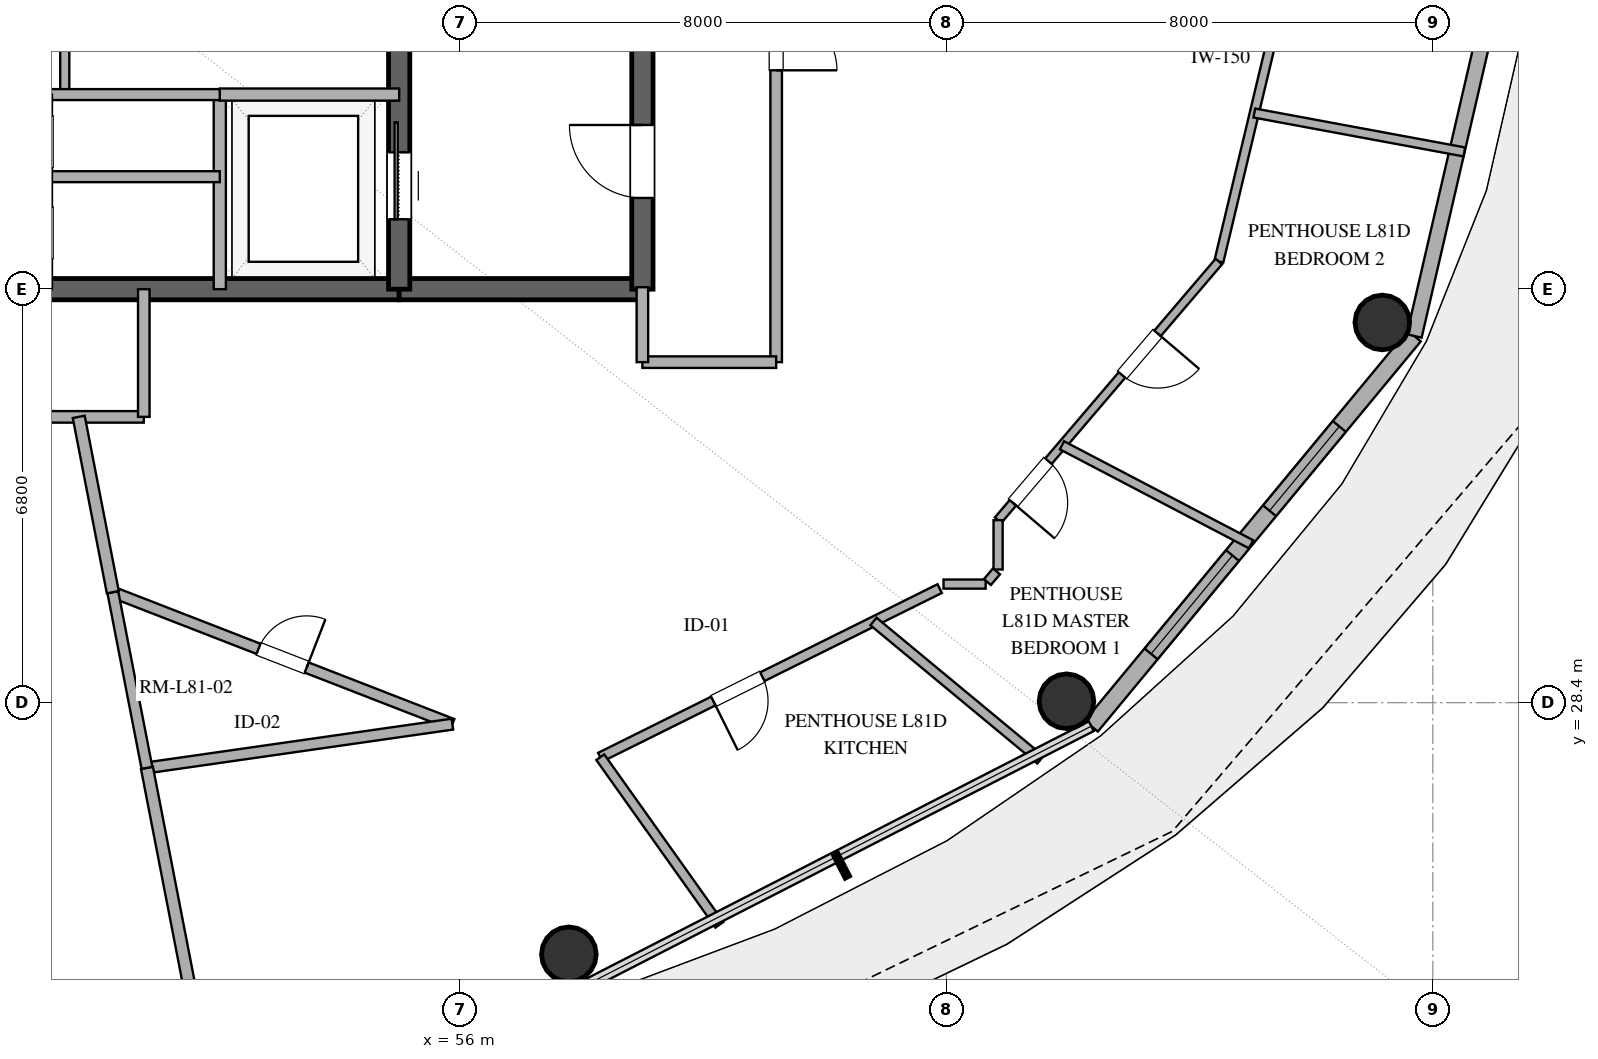
"""IFC4 building model, lengths in metres.
Left out: names, types, materials, properties, quantities, classifications, styles, units other than length and angle.
Written with IfcOpenShell. Run it as: python <this file> out.ifc"""

import sys

from ifc_helpers import new_model, si_unit, direction, frame, frame_2d, origin, origin_2d, place, context, subcontext, project, spatial, rectangle, hollow_circle, extrude, element, fill, save


model = new_model("IFC4")
c1 = context("Model", 3, precision=1e-05, world=origin(), true_north=direction((0.0, 1.0)))
c2 = subcontext(c1, "Body", "Model", "MODEL_VIEW")
j1 = project(units=[si_unit("LENGTHUNIT", "METRE"), si_unit("PLANEANGLEUNIT", "RADIAN")], contexts=[c1])
p1 = place(None, origin())
s1 = spatial("IfcSite", under=j1, at=p1, CompositionType="ELEMENT")
p2 = place(p1, origin())
s2 = spatial("IfcBuilding", under=s1, at=p2, CompositionType="ELEMENT")
p3 = place(p2, frame((0.0, 0.0, 312.6)))
s3 = spatial("IfcBuildingStorey", under=s2, at=p3, CompositionType="ELEMENT", Elevation=312.6)
p4 = place(p3, frame((41.0, 35.2, 0.0), z_axis=(0.0, 0.0, 1.0), x_axis=(1.0, 0.0, 0.0)))
e1 = element("IfcWall", 1, at=p4, inside=s3, PredefinedType="SHEAR", context=c2, shape_type="SweptSolid", body=[
    extrude(rectangle(XDim=14.0, YDim=0.35, at=frame_2d((7.0, 0.0))), origin(), (0.0, 0.0, 1.0), 3.64),
])
p5 = place(p4, frame((6.1, 0.0, 0.0)))
e2 = element("IfcOpeningElement", 2, at=p5, cuts=e1, PredefinedType="OPENING", context=c2, shape_type="SweptSolid", body=[
    extrude(rectangle(XDim=1.8, YDim=2.25, at=frame_2d((0.9, 1.125))), frame((0.0, 0.185, 0.0), z_axis=(0.0, -1.0, 0.0), x_axis=(1.0, 0.0, 0.0)), (0.0, 0.0, 1.0), 0.37),
])
p6 = place(p3, frame((55.0, 35.2, 0.0), z_axis=(0.0, 0.0, 1.0), x_axis=(1.0, 0.0, 0.0)))
e3 = element("IfcWall", 3, at=p6, inside=s3, PredefinedType="SHEAR", context=c2, shape_type="SweptSolid", body=[
    extrude(rectangle(XDim=4.0, YDim=0.35, at=frame_2d((2.0, 0.0))), origin(), (0.0, 0.0, 1.0), 3.64),
])
p7 = place(p3, frame((59.0, 35.2, 0.0), z_axis=(0.0, 0.0, 1.0), x_axis=(0.0, 1.0, 0.0)))
e4 = element("IfcWall", 4, at=p7, inside=s3, PredefinedType="SHEAR", context=c2, shape_type="SweptSolid", body=[
    extrude(rectangle(XDim=13.6, YDim=0.35, at=frame_2d((6.8, 0.0))), origin(), (0.0, 0.0, 1.0), 3.64),
])
p8 = place(p7, frame((1.5, 0.0, 0.0)))
e5 = element("IfcOpeningElement", 5, at=p8, cuts=e4, PredefinedType="OPENING", context=c2, shape_type="SweptSolid", body=[
    extrude(rectangle(XDim=1.2, YDim=2.15, at=frame_2d((0.6, 1.075))), frame((0.0, 0.185, 0.0), z_axis=(0.0, -1.0, 0.0), x_axis=(1.0, 0.0, 0.0)), (0.0, 0.0, 1.0), 0.37),
])
p9 = place(p3, frame((55.0, 35.2, 0.0), z_axis=(0.0, 0.0, 1.0), x_axis=(0.0, 1.0, 0.0)))
e6 = element("IfcWall", 6, at=p9, inside=s3, PredefinedType="SHEAR", context=c2, shape_type="SweptSolid", body=[
    extrude(rectangle(XDim=13.6, YDim=0.35, at=frame_2d((6.8, 0.0))), origin(), (0.0, 0.0, 1.0), 3.64),
])
p10 = place(p9, frame((1.15, 0.0, 0.0)))
e7 = element("IfcOpeningElement", 7, at=p10, cuts=e6, PredefinedType="OPENING", context=c2, shape_type="SweptSolid", body=[
    extrude(rectangle(XDim=1.1, YDim=2.2, at=frame_2d((0.55, 1.1))), frame((0.0, 0.185, 0.0), z_axis=(0.0, -1.0, 0.0), x_axis=(1.0, 0.0, 0.0)), (0.0, 0.0, 1.0), 0.37),
])
for number, where, z_axis, x_axis in (
    (8, (57.791, 24.261, 0.0), (0.0, 0.0, 1.0), (1.0, 0.0, 0.0)),
    (9, (65.975, 28.424, 0.0), (0.0, 0.0, 1.0), (1.0, 0.0, 0.0)),
    (10, (71.169, 34.653, 0.0), (0.0, 0.0, 1.0), (1.0, 0.0, 0.0)),
):
    element("IfcColumn", number, at=place(p3, frame(where, z_axis=z_axis, x_axis=x_axis)), inside=s3, PredefinedType="COLUMN", context=c2, shape_type="SweptSolid", body=[
        extrude(hollow_circle(Radius=0.45, WallThickness=0.025, at=origin_2d()), origin(), (0.0, 0.0, 1.0), 3.64),
    ])
p11 = place(p3, frame((48.0, 22.22, 0.0), z_axis=(0.0, 0.0, 1.0), x_axis=(0.988882522213, 0.148698881169, 0.0)))
e11 = element("IfcWall", 11, at=p11, inside=s3, PredefinedType="SOLIDWALL", context=c2, shape_type="SweptSolid", body=[
    extrude(rectangle(XDim=10.125, YDim=0.28, at=frame_2d((5.062, 0.0))), origin(), (0.0, 0.0, 1.0), 3.64),
])
p12 = place(p11, frame((1.516, 0.0, 0.0)))
e12 = element("IfcOpeningElement", 12, at=p12, cuts=e11, PredefinedType="OPENING", context=c2, shape_type="SweptSolid", body=[
    extrude(rectangle(XDim=1.6, YDim=2.25, at=frame_2d((0.8, 1.125))), frame((0.0, 0.15, 0.0), z_axis=(0.0, -1.0, 0.0), x_axis=(1.0, 0.0, 0.0)), (0.0, 0.0, 1.0), 0.3),
])
p13 = place(p11, frame((4.75, 0.0, 0.85)))
e13 = element("IfcOpeningElement", 13, at=p13, cuts=e11, PredefinedType="OPENING", context=c2, shape_type="SweptSolid", body=[
    extrude(rectangle(XDim=1.2, YDim=1.6, at=frame_2d((0.6, 0.8))), frame((0.0, 0.15, 0.0), z_axis=(0.0, -1.0, 0.0), x_axis=(1.0, 0.0, 0.0)), (0.0, 0.0, 1.0), 0.3),
])
p14 = place(p11, frame((6.668, 0.0, 0.85)))
e14 = element("IfcOpeningElement", 14, at=p14, cuts=e11, PredefinedType="OPENING", context=c2, shape_type="SweptSolid", body=[
    extrude(rectangle(XDim=1.2, YDim=1.6, at=frame_2d((0.6, 0.8))), frame((0.0, 0.15, 0.0), z_axis=(0.0, -1.0, 0.0), x_axis=(1.0, 0.0, 0.0)), (0.0, 0.0, 1.0), 0.3),
])
p15 = place(p3, frame((66.383, 28.013, 0.0), z_axis=(0.0, 0.0, 1.0), x_axis=(0.63761509934, 0.770355103243, 0.0)))
e15 = element("IfcWall", 15, at=p15, inside=s3, PredefinedType="SOLIDWALL", context=c2, shape_type="SweptSolid", body=[
    extrude(rectangle(XDim=8.33, YDim=0.28, at=frame_2d((4.165, 0.0))), origin(), (0.0, 0.0, 1.0), 3.64),
])
p16 = place(p15, frame((1.543, 0.0, 0.85)))
e16 = element("IfcOpeningElement", 16, at=p16, cuts=e15, PredefinedType="OPENING", context=c2, shape_type="SweptSolid", body=[
    extrude(rectangle(XDim=2.1, YDim=2.2, at=frame_2d((1.05, 1.1))), frame((0.0, 0.15, 0.0), z_axis=(0.0, -1.0, 0.0), x_axis=(1.0, 0.0, 0.0)), (0.0, 0.0, 1.0), 0.3),
])
p17 = place(p15, frame((4.598, 0.0, 0.85)))
e17 = element("IfcOpeningElement", 17, at=p17, cuts=e15, PredefinedType="OPENING", context=c2, shape_type="SweptSolid", body=[
    extrude(rectangle(XDim=1.8, YDim=2.2, at=frame_2d((0.9, 1.1))), frame((0.0, 0.15, 0.0), z_axis=(0.0, -1.0, 0.0), x_axis=(1.0, 0.0, 0.0)), (0.0, 0.0, 1.0), 0.3),
])
p18 = place(p3, frame((71.694, 34.43, 0.0), z_axis=(0.0, 0.0, 1.0), x_axis=(0.225635078214, 0.974211892495, 0.0)))
e18 = element("IfcWall", 18, at=p18, inside=s3, PredefinedType="SOLIDWALL", context=c2, shape_type="SweptSolid", body=[
    extrude(rectangle(XDim=7.77, YDim=0.25, at=frame_2d((3.885, 0.0))), origin(), (0.0, 0.0, 1.0), 3.64),
])
p19 = place(p3, frame((52.05, 35.2, 0.0), z_axis=(0.0, 0.0, 1.0), x_axis=(0.0, 1.0, 0.0)))
e19 = element("IfcWall", 19, at=p19, inside=s3, PredefinedType="SOLIDWALL", context=c2, shape_type="SweptSolid", body=[
    extrude(rectangle(XDim=3.2, YDim=0.2, at=frame_2d((1.6, 0.0))), origin(), (0.0, 0.0, 1.0), 2.34),
])
p20 = place(p3, frame((52.05, 38.4, 0.0), z_axis=(0.0, 0.0, 1.0), x_axis=(1.0, 0.0, 0.0)))
e20 = element("IfcWall", 20, at=p20, inside=s3, PredefinedType="SOLIDWALL", context=c2, shape_type="SweptSolid", body=[
    extrude(rectangle(XDim=2.95, YDim=0.2, at=frame_2d((1.475, 0.0))), origin(), (0.0, 0.0, 1.0), 2.34),
])
p21 = place(p3, frame((49.5, 38.4, 0.0), z_axis=(0.0, 0.0, 1.0), x_axis=(0.0, 1.0, 0.0)))
e21 = element("IfcWall", 21, at=p21, inside=s3, PredefinedType="PARTITIONING", context=c2, shape_type="SweptSolid", body=[
    extrude(rectangle(XDim=2.58, YDim=0.15, at=frame_2d((1.29, 0.0))), origin(), (0.0, 0.0, 1.0), 2.34),
])
p22 = place(p21, frame((0.8, 0.0, 0.0)))
e22 = element("IfcOpeningElement", 22, at=p22, cuts=e21, PredefinedType="OPENING", context=c2, shape_type="SweptSolid", body=[
    extrude(rectangle(XDim=0.9, YDim=2.15, at=frame_2d((0.45, 1.075))), frame((0.0, 0.085, 0.0), z_axis=(0.0, -1.0, 0.0), x_axis=(1.0, 0.0, 0.0)), (0.0, 0.0, 1.0), 0.17),
])
for number, where, z_axis, x_axis in (
    (23, (49.2, 37.05, 0.0), (0.0, 0.0, 1.0), (1.0, 0.0, 0.0)),
    (24, (49.2, 38.4, 0.0), (0.0, 0.0, 1.0), (1.0, 0.0, 0.0)),
):
    element("IfcWall", number, at=place(p3, frame(where, z_axis=z_axis, x_axis=x_axis)), inside=s3, PredefinedType="PLUMBINGWALL", context=c2, shape_type="SweptSolid", body=[
        extrude(rectangle(XDim=2.85, YDim=0.18, at=frame_2d((1.425, 0.0))), origin(), (0.0, 0.0, 1.0), 2.34),
    ])
p23 = place(p3, frame((61.2, 50.9, 0.0), z_axis=(0.0, 0.0, 1.0), x_axis=(0.0, -1.0, 0.0)))
e25 = element("IfcWall", 25, at=p23, inside=s3, PredefinedType="PARTITIONING", context=c2, shape_type="SweptSolid", body=[
    extrude(rectangle(XDim=16.9, YDim=0.19, at=frame_2d((8.45, 0.0))), origin(), (0.0, 0.0, 1.0), 2.34),
])
p24 = place(p23, frame((11.101, 0.0, 0.0)))
e26 = element("IfcOpeningElement", 26, at=p24, cuts=e25, PredefinedType="OPENING", context=c2, shape_type="SweptSolid", body=[
    extrude(rectangle(XDim=1.0, YDim=2.2, at=frame_2d((0.5, 1.1))), frame((0.0, 0.105, 0.0), z_axis=(0.0, -1.0, 0.0), x_axis=(1.0, 0.0, 0.0)), (0.0, 0.0, 1.0), 0.21),
])
p25 = place(p3, frame((50.291, 30.216, 0.0), z_axis=(0.0, 0.0, 1.0), x_axis=(0.932120865565, -0.362147334628, 0.0)))
e27 = element("IfcWall", 27, at=p25, inside=s3, PredefinedType="PLUMBINGWALL", context=c2, shape_type="SweptSolid", body=[
    extrude(rectangle(XDim=5.991, YDim=0.18, at=frame_2d((2.996, 0.0))), origin(), (0.0, 0.0, 1.0), 2.34),
])
p26 = place(p25, frame((2.571, 0.0, 0.0)))
e28 = element("IfcOpeningElement", 28, at=p26, cuts=e27, PredefinedType="OPENING", context=c2, shape_type="SweptSolid", body=[
    extrude(rectangle(XDim=0.85, YDim=2.1, at=frame_2d((0.425, 1.05))), frame((0.0, 0.1, 0.0), z_axis=(0.0, -1.0, 0.0), x_axis=(1.0, 0.0, 0.0)), (0.0, 0.0, 1.0), 0.2),
])
p27 = place(p3, frame((55.875, 28.047, 0.0), z_axis=(0.0, 0.0, 1.0), x_axis=(-0.989917714359, -0.141643633102, 0.0)))
e29 = element("IfcWall", 29, at=p27, inside=s3, PredefinedType="PLUMBINGWALL", context=c2, shape_type="SweptSolid", body=[
    extrude(rectangle(XDim=5.074, YDim=0.18, at=frame_2d((2.537, 0.0))), origin(), (0.0, 0.0, 1.0), 2.34),
])
p28 = place(p3, frame((63.89, 30.276, 0.0), z_axis=(0.0, 0.0, 1.0), x_axis=(-0.895583517023, -0.444893429977, 0.0)))
e30 = element("IfcWall", 30, at=p28, inside=s3, PredefinedType="PLUMBINGWALL", context=c2, shape_type="SweptSolid", body=[
    extrude(rectangle(XDim=6.233, YDim=0.16, at=frame_2d((3.117, 0.0))), origin(), (0.0, 0.0, 1.0), 2.34),
])
p29 = place(p28, frame((3.257, 0.0, 0.0)))
e31 = element("IfcOpeningElement", 31, at=p29, cuts=e30, PredefinedType="OPENING", context=c2, shape_type="SweptSolid", body=[
    extrude(rectangle(XDim=0.9, YDim=2.1, at=frame_2d((0.45, 1.05))), frame((0.0, 0.09, 0.0), z_axis=(0.0, -1.0, 0.0), x_axis=(1.0, 0.0, 0.0)), (0.0, 0.0, 1.0), 0.18),
])
p30 = place(p3, frame((51.759, 22.664, 0.0), z_axis=(0.0, 0.0, 1.0), x_axis=(-0.190846277625, 0.981619935778, 0.0)))
e32 = element("IfcWall", 32, at=p30, inside=s3, PredefinedType="PARTITIONING", context=c2, shape_type="SweptSolid", body=[
    extrude(rectangle(XDim=4.751, YDim=0.2, at=frame_2d((2.375, 0.0))), origin(), (0.0, 0.0, 1.0), 2.34),
])
p31 = place(p3, frame((50.8, 33.1, 0.0), z_axis=(0.0, 0.0, 1.0), x_axis=(-1.0, 0.0, 0.0)))
e33 = element("IfcWall", 33, at=p31, inside=s3, PredefinedType="PARTITIONING", context=c2, shape_type="SweptSolid", body=[
    extrude(rectangle(XDim=5.6, YDim=0.19, at=frame_2d((2.8, 0.0))), origin(), (0.0, 0.0, 1.0), 2.34),
])
p32 = place(p3, frame((68.481, 35.655, 0.0), z_axis=(0.0, 0.0, 1.0), x_axis=(0.232298462197, 0.972644551962, 0.0)))
e34 = element("IfcWall", 34, at=p32, inside=s3, PredefinedType="PARTITIONING", context=c2, shape_type="SweptSolid", body=[
    extrude(rectangle(XDim=6.523, YDim=0.15, at=frame_2d((3.262, 0.0))), origin(), (0.0, 0.0, 1.0), 2.34),
])
p33 = place(p3, frame((68.481, 35.655, 0.0), z_axis=(0.0, 0.0, 1.0), x_axis=(-0.649186624806, -0.760629164688, 0.0)))
e35 = element("IfcWall", 35, at=p33, inside=s3, PredefinedType="PARTITIONING", context=c2, shape_type="SweptSolid", body=[
    extrude(rectangle(XDim=5.593, YDim=0.14, at=frame_2d((2.796, 0.0))), origin(), (0.0, 0.0, 1.0), 2.34),
])
p34 = place(p33, frame((1.553, 0.0, 0.0)))
e36 = element("IfcOpeningElement", 36, at=p34, cuts=e35, PredefinedType="OPENING", context=c2, shape_type="SweptSolid", body=[
    extrude(rectangle(XDim=0.9, YDim=2.1, at=frame_2d((0.45, 1.05))), frame((0.0, 0.08, 0.0), z_axis=(0.0, -1.0, 0.0), x_axis=(1.0, 0.0, 0.0)), (0.0, 0.0, 1.0), 0.16),
])
p35 = place(p33, frame((4.317, 0.0, 0.0)))
e37 = element("IfcOpeningElement", 37, at=p35, cuts=e35, PredefinedType="OPENING", context=c2, shape_type="SweptSolid", body=[
    extrude(rectangle(XDim=0.9, YDim=2.1, at=frame_2d((0.45, 1.05))), frame((0.0, 0.08, 0.0), z_axis=(0.0, -1.0, 0.0), x_axis=(1.0, 0.0, 0.0)), (0.0, 0.0, 1.0), 0.16),
])
p36 = place(p3, frame((65.545, 27.461, 0.0), z_axis=(0.0, 0.0, 1.0), x_axis=(-0.770009063214, 0.63803294787, 0.0)))
e38 = element("IfcWall", 38, at=p36, inside=s3, PredefinedType="PLUMBINGWALL", context=c2, shape_type="SweptSolid", body=[
    extrude(rectangle(XDim=3.565, YDim=0.16, at=frame_2d((1.782, 0.0))), origin(), (0.0, 0.0, 1.0), 2.34),
])
p37 = place(p3, frame((72.518, 37.457, 0.0), z_axis=(0.0, 0.0, 1.0), x_axis=(-0.983264946239, 0.182181353322, 0.0)))
e39 = element("IfcWall", 39, at=p37, inside=s3, PredefinedType="PARTITIONING", context=c2, shape_type="SweptSolid", body=[
    extrude(rectangle(XDim=3.512, YDim=0.15, at=frame_2d((1.756, 0.0))), origin(), (0.0, 0.0, 1.0), 2.34),
])
p38 = place(p3, frame((65.901, 32.632, 0.0), z_axis=(0.0, 0.0, 1.0), x_axis=(0.886011177193, -0.463663880293, 0.0)))
e40 = element("IfcWall", 40, at=p38, inside=s3, PredefinedType="PARTITIONING", context=c2, shape_type="SweptSolid", body=[
    extrude(rectangle(XDim=3.51, YDim=0.15, at=frame_2d((1.755, 0.0))), origin(), (0.0, 0.0, 1.0), 2.34),
])
p39 = place(p3, frame((58.307, 27.503, 0.0), z_axis=(0.0, 0.0, 1.0), x_axis=(0.579474768135, -0.814990179754, 0.0)))
e41 = element("IfcWall", 41, at=p39, inside=s3, PredefinedType="PLUMBINGWALL", context=c2, shape_type="SweptSolid", body=[
    extrude(rectangle(XDim=3.381, YDim=0.16, at=frame_2d((1.691, 0.0))), origin(), (0.0, 0.0, 1.0), 2.34),
])
p40 = place(p3, frame((50.852, 27.328, 0.0), z_axis=(0.0, 0.0, 1.0), x_axis=(-0.190751955115, 0.981638269232, 0.0)))
e42 = element("IfcWall", 42, at=p40, inside=s3, PredefinedType="PLUMBINGWALL", context=c2, shape_type="SweptSolid", body=[
    extrude(rectangle(XDim=2.942, YDim=0.18, at=frame_2d((1.471, 0.0))), origin(), (0.0, 0.0, 1.0), 2.34),
])
p41 = place(p3, frame((50.291, 30.216, 0.0), z_axis=(0.0, 0.0, 1.0), x_axis=(-0.190807376865, 0.981627498053, 0.0)))
e43 = element("IfcWall", 43, at=p41, inside=s3, PredefinedType="PARTITIONING", context=c2, shape_type="SweptSolid", body=[
    extrude(rectangle(XDim=2.938, YDim=0.2, at=frame_2d((1.469, 0.0))), origin(), (0.0, 0.0, 1.0), 2.34),
])
p42 = place(p3, frame((61.2, 34.0, 0.0), z_axis=(0.0, 0.0, 1.0), x_axis=(-1.0, 0.0, 0.0)))
e44 = element("IfcWall", 44, at=p42, inside=s3, PredefinedType="PARTITIONING", context=c2, shape_type="SweptSolid", body=[
    extrude(rectangle(XDim=2.2, YDim=0.19, at=frame_2d((1.1, 0.0))), origin(), (0.0, 0.0, 1.0), 2.34),
])
p43 = place(p3, frame((50.8, 35.2, 0.0), z_axis=(0.0, 0.0, 1.0), x_axis=(0.0, -1.0, 0.0)))
e45 = element("IfcWall", 45, at=p43, inside=s3, PredefinedType="PARTITIONING", context=c2, shape_type="SweptSolid", body=[
    extrude(rectangle(XDim=2.1, YDim=0.19, at=frame_2d((1.05, 0.0))), origin(), (0.0, 0.0, 1.0), 2.34),
])
p44 = place(p3, frame((59.0, 34.0, 0.0), z_axis=(0.0, 0.0, 1.0), x_axis=(0.0, 1.0, 0.0)))
e46 = element("IfcWall", 46, at=p44, inside=s3, PredefinedType="PARTITIONING", context=c2, shape_type="SweptSolid", body=[
    extrude(rectangle(XDim=1.232, YDim=0.19, at=frame_2d((0.616, 0.0))), origin(), (0.0, 0.0, 1.0), 2.34),
])
p45 = place(p3, frame((64.85, 31.401, 0.0), z_axis=(0.0, 0.0, 1.0), x_axis=(0.0, -1.0, 0.0)))
e47 = element("IfcWall", 47, at=p45, inside=s3, PredefinedType="PARTITIONING", context=c2, shape_type="SweptSolid", body=[
    extrude(rectangle(XDim=0.812, YDim=0.15, at=frame_2d((0.406, 0.0))), origin(), (0.0, 0.0, 1.0), 2.34),
])
p46 = place(p3, frame((64.646, 30.35, 0.0), z_axis=(0.0, 0.0, 1.0), x_axis=(-1.0, 0.0, 0.0)))
e48 = element("IfcWall", 48, at=p46, inside=s3, PredefinedType="PARTITIONING", context=c2, shape_type="SweptSolid", body=[
    extrude(rectangle(XDim=0.693, YDim=0.15, at=frame_2d((0.346, 0.0))), origin(), (0.0, 0.0, 1.0), 2.34),
])
p47 = place(p3, frame((64.824, 30.559, 0.0), z_axis=(0.0, 0.0, 1.0), x_axis=(-0.648874632887, -0.760895334981, 0.0)))
e49 = element("IfcWall", 49, at=p47, inside=s3, PredefinedType="PARTITIONING", context=c2, shape_type="SweptSolid", body=[
    extrude(rectangle(XDim=0.231, YDim=0.15, at=frame_2d((0.115, 0.0))), origin(), (0.0, 0.0, 1.0), 2.34),
])
p48 = place(p16, origin())
e50 = element("IfcWindow", 50, at=p48, inside=s3, PartitioningType="SINGLE_PANEL", PredefinedType="WINDOW", context=c2, shape_type="SweptSolid", body=[
    extrude(rectangle(XDim=2.1, YDim=2.2, at=frame_2d((1.05, 1.1))), frame((0.0, 0.03, 0.0), z_axis=(0.0, -1.0, 0.0), x_axis=(1.0, 0.0, 0.0)), (0.0, 0.0, 1.0), 0.06),
])
fill(e16, e50)
p49 = place(p17, origin())
e51 = element("IfcWindow", 51, at=p49, inside=s3, PartitioningType="SINGLE_PANEL", PredefinedType="WINDOW", context=c2, shape_type="SweptSolid", body=[
    extrude(rectangle(XDim=1.8, YDim=2.2, at=frame_2d((0.9, 1.1))), frame((0.0, 0.03, 0.0), z_axis=(0.0, -1.0, 0.0), x_axis=(1.0, 0.0, 0.0)), (0.0, 0.0, 1.0), 0.06),
])
fill(e17, e51)
p50 = place(p10, origin())
e52 = element("IfcDoor", 52, at=p50, inside=s3, OperationType="SLIDING_TO_RIGHT", PredefinedType="DOOR", context=c2, shape_type="SweptSolid", body=[
    extrude(rectangle(XDim=1.1, YDim=2.2, at=frame_2d((0.55, 1.1))), frame((0.0, 0.025, 0.0), z_axis=(0.0, -1.0, 0.0), x_axis=(1.0, 0.0, 0.0)), (0.0, 0.0, 1.0), 0.05),
])
fill(e7, e52)
p51 = place(p8, origin())
e53 = element("IfcDoor", 53, at=p51, inside=s3, OperationType="SINGLE_SWING_RIGHT", PredefinedType="DOOR", context=c2, shape_type="SweptSolid", body=[
    extrude(rectangle(XDim=1.2, YDim=2.15, at=frame_2d((0.6, 1.075))), frame((0.0, 0.025, 0.0), z_axis=(0.0, -1.0, 0.0), x_axis=(1.0, 0.0, 0.0)), (0.0, 0.0, 1.0), 0.05),
])
fill(e5, e53)
p52 = place(p24, origin())
e54 = element("IfcDoor", 54, at=p52, inside=s3, OperationType="SINGLE_SWING_RIGHT", PredefinedType="DOOR", context=c2, shape_type="SweptSolid", body=[
    extrude(rectangle(XDim=1.0, YDim=2.2, at=frame_2d((0.5, 1.1))), frame((0.0, 0.025, 0.0), z_axis=(0.0, -1.0, 0.0), x_axis=(1.0, 0.0, 0.0)), (0.0, 0.0, 1.0), 0.05),
])
fill(e26, e54)
p53 = place(p26, origin())
e55 = element("IfcDoor", 55, at=p53, inside=s3, OperationType="SINGLE_SWING_RIGHT", PredefinedType="DOOR", context=c2, shape_type="SweptSolid", body=[
    extrude(rectangle(XDim=0.85, YDim=2.1, at=frame_2d((0.425, 1.05))), frame((0.0, 0.025, 0.0), z_axis=(0.0, -1.0, 0.0), x_axis=(1.0, 0.0, 0.0)), (0.0, 0.0, 1.0), 0.05),
])
fill(e28, e55)
p54 = place(p29, origin())
e56 = element("IfcDoor", 56, at=p54, inside=s3, OperationType="SINGLE_SWING_RIGHT", PredefinedType="DOOR", context=c2, shape_type="SweptSolid", body=[
    extrude(rectangle(XDim=0.9, YDim=2.1, at=frame_2d((0.45, 1.05))), frame((0.0, 0.025, 0.0), z_axis=(0.0, -1.0, 0.0), x_axis=(1.0, 0.0, 0.0)), (0.0, 0.0, 1.0), 0.05),
])
fill(e31, e56)
p55 = place(p34, origin())
e57 = element("IfcDoor", 57, at=p55, inside=s3, OperationType="SINGLE_SWING_LEFT", PredefinedType="DOOR", context=c2, shape_type="SweptSolid", body=[
    extrude(rectangle(XDim=0.9, YDim=2.1, at=frame_2d((0.45, 1.05))), frame((0.0, 0.025, 0.0), z_axis=(0.0, -1.0, 0.0), x_axis=(1.0, 0.0, 0.0)), (0.0, 0.0, 1.0), 0.05),
])
fill(e36, e57)
p56 = place(p35, origin())
e58 = element("IfcDoor", 58, at=p56, inside=s3, OperationType="SINGLE_SWING_RIGHT", PredefinedType="DOOR", context=c2, shape_type="SweptSolid", body=[
    extrude(rectangle(XDim=0.9, YDim=2.1, at=frame_2d((0.45, 1.05))), frame((0.0, 0.025, 0.0), z_axis=(0.0, -1.0, 0.0), x_axis=(1.0, 0.0, 0.0)), (0.0, 0.0, 1.0), 0.05),
])
fill(e37, e58)
save(model, sys.argv[1])
